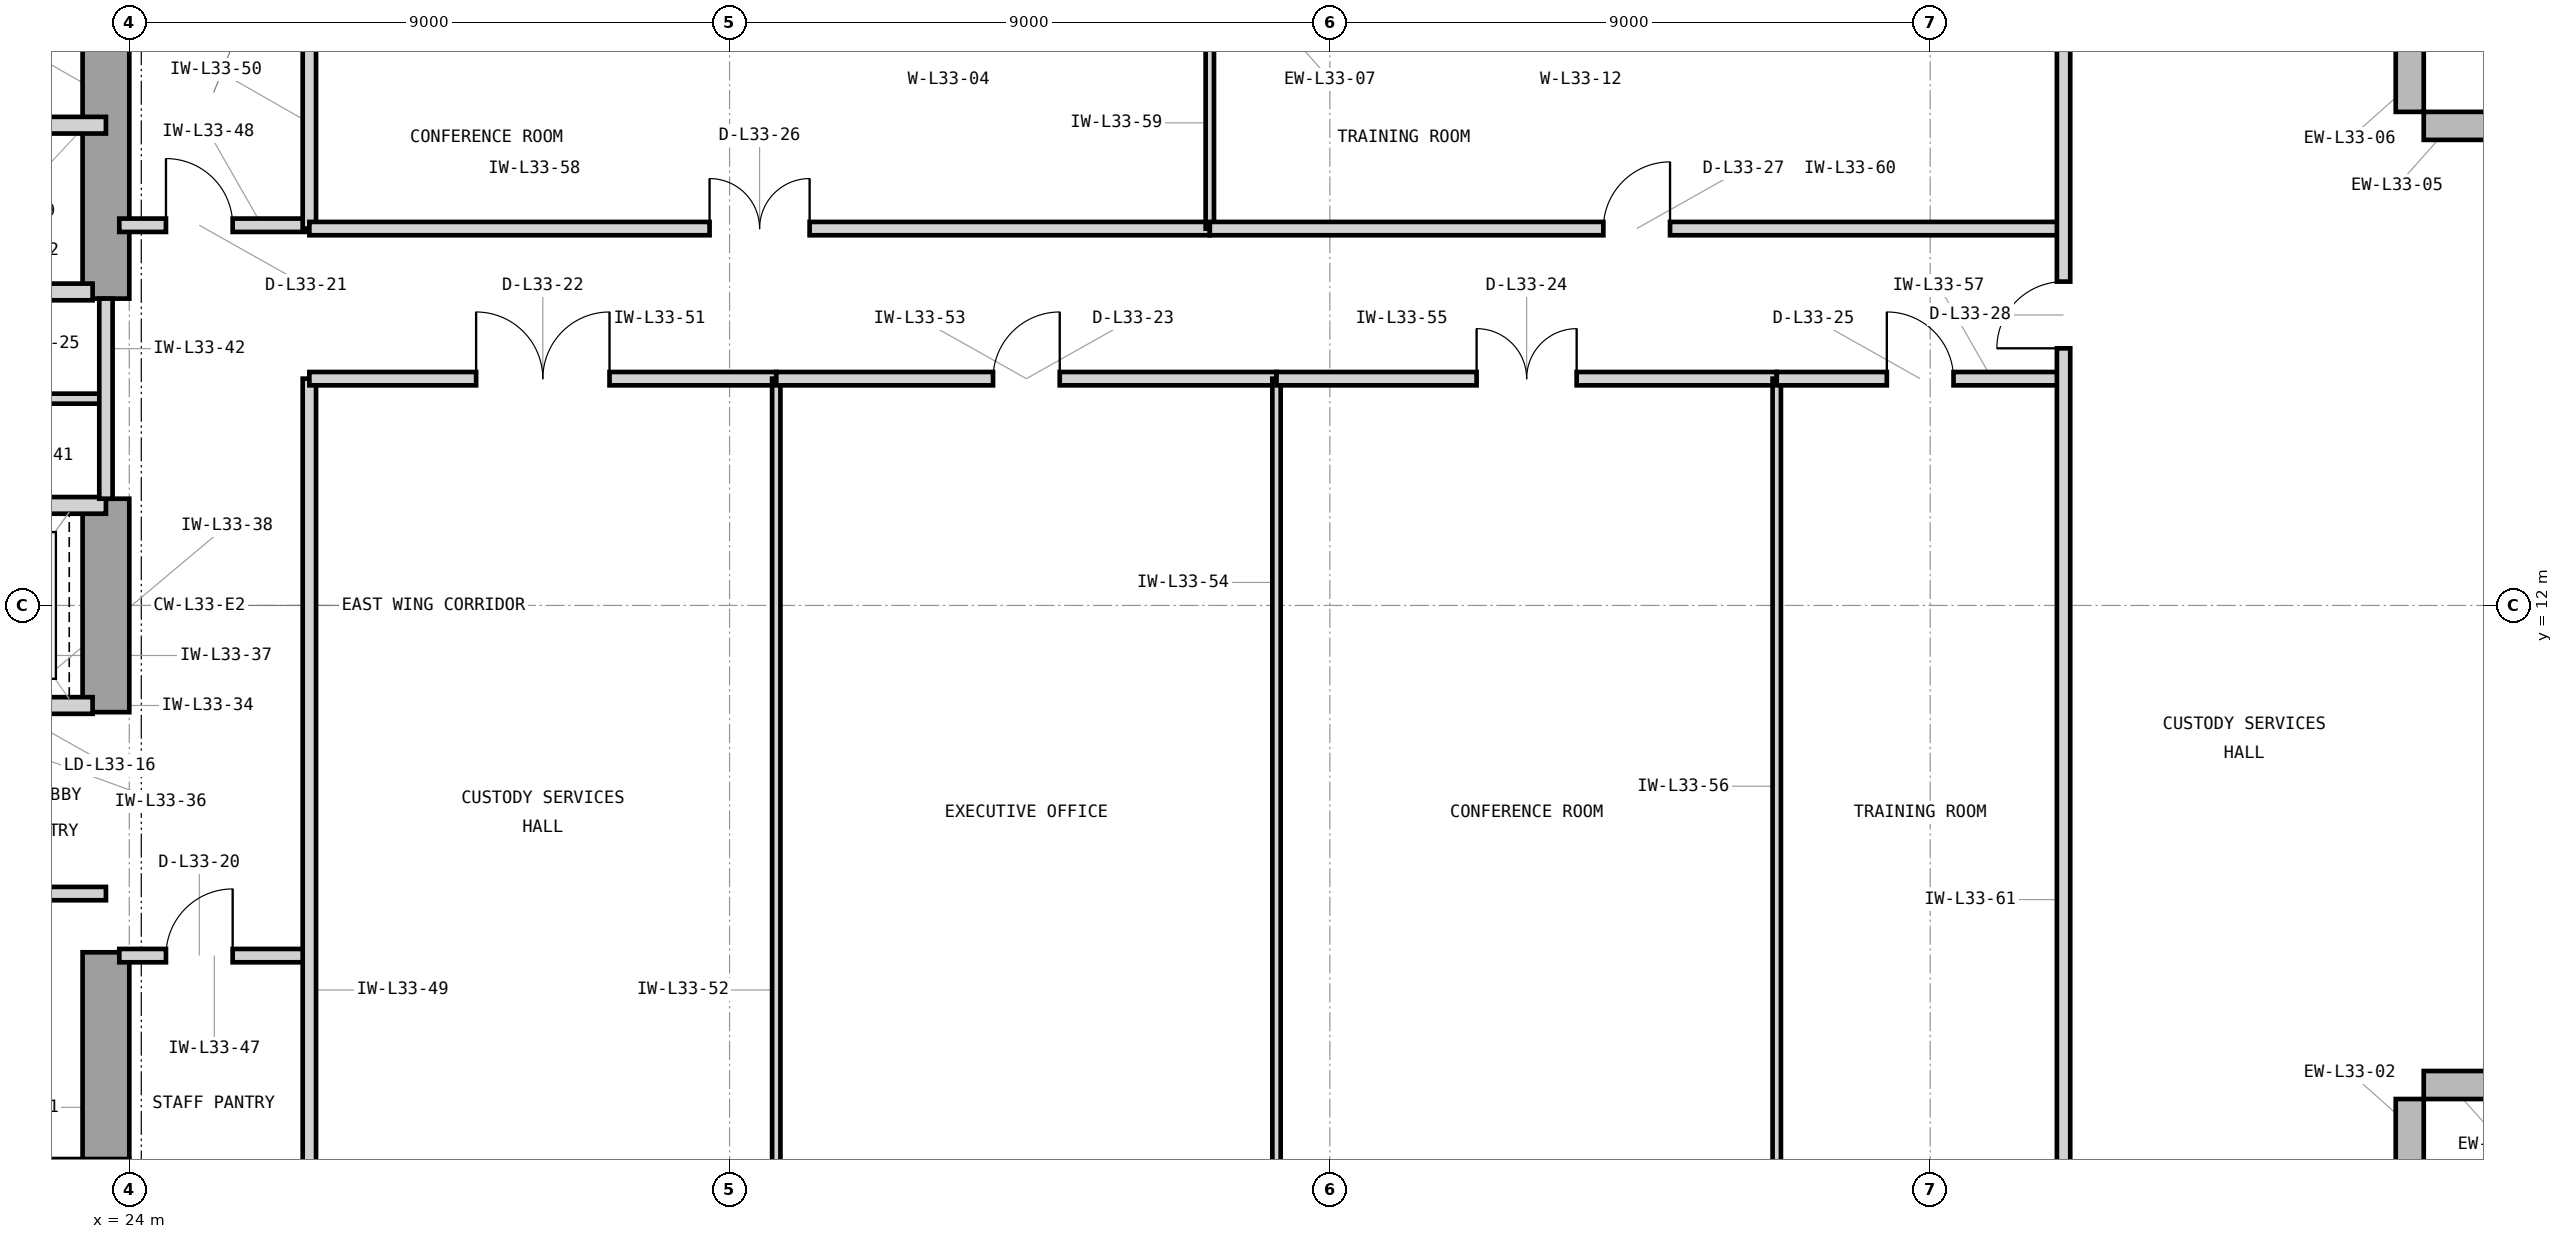
"""IFC4 building model, lengths in metres.
Left out: names, types, materials, properties, quantities, classifications, styles, units other than length and angle.
Written with IfcOpenShell. Run it as: python <this file> out.ifc"""

import sys

from ifc_helpers import new_model, si_unit, direction, frame, frame_2d, origin, place, context, subcontext, project, spatial, rectangle, extrude, element, fill, save


model = new_model("IFC4")
c1 = context("Model", 3, precision=1e-05, world=origin(), true_north=direction((0.0, 1.0)))
c2 = subcontext(c1, "Body", "Model", "MODEL_VIEW")
j1 = project(units=[si_unit("LENGTHUNIT", "METRE"), si_unit("PLANEANGLEUNIT", "RADIAN")], contexts=[c1])
p1 = place(None, origin())
s1 = spatial("IfcSite", under=j1, at=p1, CompositionType="ELEMENT")
p2 = place(p1, origin())
s2 = spatial("IfcBuilding", under=s1, at=p2, CompositionType="ELEMENT")
p3 = place(p2, frame((0.0, 0.0, 140.1)))
s3 = spatial("IfcBuildingStorey", under=s2, at=p3, CompositionType="ELEMENT", Elevation=140.1)
p4 = place(p3, frame((7.475, 3.35, 0.0), z_axis=(0.0, 0.0, 1.0), x_axis=(1.0, 0.0, 0.0)))
e1 = element("IfcWall", 1, at=p4, inside=s3, PredefinedType="SHEAR", context=c2, shape_type="SweptSolid", body=[
    extrude(rectangle(XDim=16.525, YDim=0.7, at=frame_2d((8.262, 0.0))), origin(), (0.0, 0.0, 1.0), 3.9),
])
p5 = place(p3, frame((23.65, 3.7, 0.0), z_axis=(0.0, 0.0, 1.0), x_axis=(0.0, 1.0, 0.0)))
e2 = element("IfcWall", 2, at=p5, inside=s3, PredefinedType="SHEAR", context=c2, shape_type="SweptSolid", body=[
    extrude(rectangle(XDim=3.1, YDim=0.7, at=frame_2d((1.55, 0.0))), origin(), (0.0, 0.0, 1.0), 3.9),
])
p6 = place(p3, frame((23.65, 10.4, 0.0), z_axis=(0.0, 0.0, 1.0), x_axis=(0.0, 1.0, 0.0)))
e3 = element("IfcWall", 3, at=p6, inside=s3, PredefinedType="SHEAR", context=c2, shape_type="SweptSolid", body=[
    extrude(rectangle(XDim=3.2, YDim=0.7, at=frame_2d((1.6, 0.0))), origin(), (0.0, 0.0, 1.0), 3.9),
])
p7 = place(p3, frame((23.65, 16.6, 0.0), z_axis=(0.0, 0.0, 1.0), x_axis=(0.0, 1.0, 0.0)))
e4 = element("IfcWall", 4, at=p7, inside=s3, PredefinedType="SHEAR", context=c2, shape_type="SweptSolid", body=[
    extrude(rectangle(XDim=4.05, YDim=0.7, at=frame_2d((2.025, 0.0))), origin(), (0.0, 0.0, 1.0), 3.9),
])
for number, where, z_axis, x_axis in (
    (5, (58.19, 3.0, 0.0), (0.0, 0.0, 1.0), (0.0, 1.0, 0.0)),
    (6, (58.4, 4.81, 0.0), (0.0, 0.0, 1.0), (1.0, 0.0, 0.0)),
    (7, (60.0, 19.19, 0.0), (0.0, 0.0, 1.0), (-1.0, 0.0, 0.0)),
    (8, (58.19, 19.4, 0.0), (0.0, 0.0, 1.0), (0.0, 1.0, 0.0)),
):
    element("IfcWall", number, at=place(p3, frame(where, z_axis=z_axis, x_axis=x_axis)), inside=s3, PredefinedType="STANDARD", context=c2, shape_type="SweptSolid", body=[
        extrude(rectangle(XDim=1.6, YDim=0.42, at=frame_2d((0.8, 0.0))), origin(), (0.0, 0.0, 1.0), 3.7),
    ])
p8 = place(p3, frame((21.05, 16.7, 0.0), z_axis=(0.0, 0.0, 1.0), x_axis=(1.0, 0.0, 0.0)))
e9 = element("IfcWall", 9, at=p8, inside=s3, PredefinedType="PARTITIONING", context=c2, shape_type="SweptSolid", body=[
    extrude(rectangle(XDim=2.4, YDim=0.25, at=frame_2d((1.2, 0.0))), origin(), (0.0, 0.0, 1.0), 3.233),
])
p9 = place(p3, frame((16.45, 19.2, 0.0), z_axis=(0.0, 0.0, 1.0), x_axis=(1.0, 0.0, 0.0)))
e10 = element("IfcWall", 10, at=p9, inside=s3, PredefinedType="PARTITIONING", context=c2, shape_type="SweptSolid", body=[
    extrude(rectangle(XDim=7.2, YDim=0.25, at=frame_2d((3.6, 0.0))), origin(), (0.0, 0.0, 1.0), 3.69),
])
p10 = place(p3, frame((20.55, 7.68, 0.0), z_axis=(0.0, 0.0, 1.0), x_axis=(1.0, 0.0, 0.0)))
e11 = element("IfcWall", 11, at=p10, inside=s3, PredefinedType="PARTITIONING", context=c2, shape_type="SweptSolid", body=[
    extrude(rectangle(XDim=3.1, YDim=0.2, at=frame_2d((1.55, 0.0))), origin(), (0.0, 0.0, 1.0), 3.69),
])
p11 = place(p10, frame((1.075, 0.0, 0.0)))
e12 = element("IfcOpeningElement", 12, at=p11, cuts=e11, PredefinedType="OPENING", context=c2, shape_type="SweptSolid", body=[
    extrude(rectangle(XDim=0.95, YDim=2.1, at=frame_2d((0.475, 1.05))), frame((0.0, 0.11, 0.0), z_axis=(0.0, -1.0, 0.0), x_axis=(1.0, 0.0, 0.0)), (0.0, 0.0, 1.0), 0.22),
])
p12 = place(p3, frame((21.05, 10.5, 0.0), z_axis=(0.0, 0.0, 1.0), x_axis=(1.0, 0.0, 0.0)))
e13 = element("IfcWall", 13, at=p12, inside=s3, PredefinedType="PARTITIONING", context=c2, shape_type="SweptSolid", body=[
    extrude(rectangle(XDim=2.4, YDim=0.25, at=frame_2d((1.2, 0.0))), origin(), (0.0, 0.0, 1.0), 3.233),
])
p13 = place(p12, frame((0.48, 0.0, 0.0)))
e14 = element("IfcOpeningElement", 14, at=p13, cuts=e13, PredefinedType="OPENING", context=c2, shape_type="SweptSolid", body=[
    extrude(rectangle(XDim=1.15, YDim=2.25, at=frame_2d((0.575, 1.125))), frame((0.0, 0.135, 0.0), z_axis=(0.0, -1.0, 0.0), x_axis=(1.0, 0.0, 0.0)), (0.0, 0.0, 1.0), 0.27),
])
p14 = place(p3, frame((14.7, 13.5, 0.0), z_axis=(0.0, 0.0, 1.0), x_axis=(1.0, 0.0, 0.0)))
e15 = element("IfcWall", 15, at=p14, inside=s3, PredefinedType="PARTITIONING", context=c2, shape_type="SweptSolid", body=[
    extrude(rectangle(XDim=8.95, YDim=0.25, at=frame_2d((4.475, 0.0))), origin(), (0.0, 0.0, 1.0), 3.233),
])
p15 = place(p3, frame((16.6, 15.1, 0.0), z_axis=(0.0, 0.0, 1.0), x_axis=(1.0, 0.0, 0.0)))
e16 = element("IfcWall", 16, at=p15, inside=s3, PredefinedType="PARTITIONING", context=c2, shape_type="SweptSolid", body=[
    extrude(rectangle(XDim=7.05, YDim=0.15, at=frame_2d((3.525, 0.0))), origin(), (0.0, 0.0, 1.0), 3.69),
])
p16 = place(p3, frame((23.65, 13.6, 0.0), z_axis=(0.0, 0.0, 1.0), x_axis=(0.0, 1.0, 0.0)))
e17 = element("IfcWall", 17, at=p16, inside=s3, PredefinedType="PARTITIONING", context=c2, shape_type="SweptSolid", body=[
    extrude(rectangle(XDim=3.0, YDim=0.2, at=frame_2d((1.5, 0.0))), origin(), (0.0, 0.0, 1.0), 3.69),
])
p17 = place(p3, frame((23.85, 6.75, 0.0), z_axis=(0.0, 0.0, 1.0), x_axis=(1.0, 0.0, 0.0)))
e18 = element("IfcWall", 18, at=p17, inside=s3, PredefinedType="PARTITIONING", context=c2, shape_type="SweptSolid", body=[
    extrude(rectangle(XDim=2.85, YDim=0.2, at=frame_2d((1.425, 0.0))), origin(), (0.0, 0.0, 1.0), 3.69),
])
p18 = place(p17, frame((0.7, 0.0, 0.0)))
e19 = element("IfcOpeningElement", 19, at=p18, cuts=e18, PredefinedType="OPENING", context=c2, shape_type="SweptSolid", body=[
    extrude(rectangle(XDim=1.0, YDim=2.15, at=frame_2d((0.5, 1.075))), frame((0.0, 0.11, 0.0), z_axis=(0.0, -1.0, 0.0), x_axis=(1.0, 0.0, 0.0)), (0.0, 0.0, 1.0), 0.22),
])
p19 = place(p3, frame((23.85, 17.7, 0.0), z_axis=(0.0, 0.0, 1.0), x_axis=(1.0, 0.0, 0.0)))
e20 = element("IfcWall", 20, at=p19, inside=s3, PredefinedType="PARTITIONING", context=c2, shape_type="SweptSolid", body=[
    extrude(rectangle(XDim=2.85, YDim=0.2, at=frame_2d((1.425, 0.0))), origin(), (0.0, 0.0, 1.0), 3.69),
])
p20 = place(p19, frame((0.7, 0.0, 0.0)))
e21 = element("IfcOpeningElement", 21, at=p20, cuts=e20, PredefinedType="OPENING", context=c2, shape_type="SweptSolid", body=[
    extrude(rectangle(XDim=1.0, YDim=2.15, at=frame_2d((0.5, 1.075))), frame((0.0, 0.11, 0.0), z_axis=(0.0, -1.0, 0.0), x_axis=(1.0, 0.0, 0.0)), (0.0, 0.0, 1.0), 0.22),
])
p21 = place(p3, frame((26.7, 3.18, 0.0), z_axis=(0.0, 0.0, 1.0), x_axis=(0.0, 1.0, 0.0)))
e22 = element("IfcWall", 22, at=p21, inside=s3, PredefinedType="PARTITIONING", context=c2, shape_type="SweptSolid", body=[
    extrude(rectangle(XDim=12.22, YDim=0.2, at=frame_2d((6.11, 0.0))), origin(), (0.0, 0.0, 1.0), 3.69),
])
p22 = place(p3, frame((26.7, 17.65, 0.0), z_axis=(0.0, 0.0, 1.0), x_axis=(0.0, 1.0, 0.0)))
e23 = element("IfcWall", 23, at=p22, inside=s3, PredefinedType="PARTITIONING", context=c2, shape_type="SweptSolid", body=[
    extrude(rectangle(XDim=3.17, YDim=0.2, at=frame_2d((1.585, 0.0))), origin(), (0.0, 0.0, 1.0), 3.69),
])
p23 = place(p3, frame((26.7, 15.4, 0.0), z_axis=(0.0, 0.0, 1.0), x_axis=(1.0, 0.0, 0.0)))
e24 = element("IfcWall", 24, at=p23, inside=s3, PredefinedType="PARTITIONING", context=c2, shape_type="SweptSolid", body=[
    extrude(rectangle(XDim=7.0, YDim=0.2, at=frame_2d((3.5, 0.0))), origin(), (0.0, 0.0, 1.0), 3.69),
])
p24 = place(p23, frame((2.5, 0.0, 0.0)))
e25 = element("IfcOpeningElement", 25, at=p24, cuts=e24, PredefinedType="OPENING", context=c2, shape_type="SweptSolid", body=[
    extrude(rectangle(XDim=2.0, YDim=2.5, at=frame_2d((1.0, 1.25))), frame((0.0, 0.11, 0.0), z_axis=(0.0, -1.0, 0.0), x_axis=(1.0, 0.0, 0.0)), (0.0, 0.0, 1.0), 0.22),
])
p25 = place(p3, frame((33.7, 3.18, 0.0), z_axis=(0.0, 0.0, 1.0), x_axis=(0.0, 1.0, 0.0)))
e26 = element("IfcWall", 26, at=p25, inside=s3, PredefinedType="PARTITIONING", context=c2, shape_type="SweptSolid", body=[
    extrude(rectangle(XDim=12.22, YDim=0.125, at=frame_2d((6.11, 0.0))), origin(), (0.0, 0.0, 1.0), 3.69),
])
p26 = place(p3, frame((33.7, 15.4, 0.0), z_axis=(0.0, 0.0, 1.0), x_axis=(1.0, 0.0, 0.0)))
e27 = element("IfcWall", 27, at=p26, inside=s3, PredefinedType="PARTITIONING", context=c2, shape_type="SweptSolid", body=[
    extrude(rectangle(XDim=7.5, YDim=0.2, at=frame_2d((3.75, 0.0))), origin(), (0.0, 0.0, 1.0), 3.69),
])
p27 = place(p26, frame((3.25, 0.0, 0.0)))
e28 = element("IfcOpeningElement", 28, at=p27, cuts=e27, PredefinedType="OPENING", context=c2, shape_type="SweptSolid", body=[
    extrude(rectangle(XDim=1.0, YDim=2.15, at=frame_2d((0.5, 1.075))), frame((0.0, 0.11, 0.0), z_axis=(0.0, -1.0, 0.0), x_axis=(1.0, 0.0, 0.0)), (0.0, 0.0, 1.0), 0.22),
])
p28 = place(p3, frame((41.2, 3.18, 0.0), z_axis=(0.0, 0.0, 1.0), x_axis=(0.0, 1.0, 0.0)))
e29 = element("IfcWall", 29, at=p28, inside=s3, PredefinedType="PARTITIONING", context=c2, shape_type="SweptSolid", body=[
    extrude(rectangle(XDim=12.22, YDim=0.125, at=frame_2d((6.11, 0.0))), origin(), (0.0, 0.0, 1.0), 3.69),
])
p29 = place(p3, frame((41.2, 15.4, 0.0), z_axis=(0.0, 0.0, 1.0), x_axis=(1.0, 0.0, 0.0)))
e30 = element("IfcWall", 30, at=p29, inside=s3, PredefinedType="PARTITIONING", context=c2, shape_type="SweptSolid", body=[
    extrude(rectangle(XDim=7.5, YDim=0.2, at=frame_2d((3.75, 0.0))), origin(), (0.0, 0.0, 1.0), 3.69),
])
p30 = place(p29, frame((3.0, 0.0, 0.0)))
e31 = element("IfcOpeningElement", 31, at=p30, cuts=e30, PredefinedType="OPENING", context=c2, shape_type="SweptSolid", body=[
    extrude(rectangle(XDim=1.5, YDim=2.3, at=frame_2d((0.75, 1.15))), frame((0.0, 0.11, 0.0), z_axis=(0.0, -1.0, 0.0), x_axis=(1.0, 0.0, 0.0)), (0.0, 0.0, 1.0), 0.22),
])
p31 = place(p3, frame((48.7, 3.18, 0.0), z_axis=(0.0, 0.0, 1.0), x_axis=(0.0, 1.0, 0.0)))
e32 = element("IfcWall", 32, at=p31, inside=s3, PredefinedType="PARTITIONING", context=c2, shape_type="SweptSolid", body=[
    extrude(rectangle(XDim=12.22, YDim=0.125, at=frame_2d((6.11, 0.0))), origin(), (0.0, 0.0, 1.0), 3.69),
])
p32 = place(p3, frame((48.7, 15.4, 0.0), z_axis=(0.0, 0.0, 1.0), x_axis=(1.0, 0.0, 0.0)))
e33 = element("IfcWall", 33, at=p32, inside=s3, PredefinedType="PARTITIONING", context=c2, shape_type="SweptSolid", body=[
    extrude(rectangle(XDim=4.3, YDim=0.2, at=frame_2d((2.15, 0.0))), origin(), (0.0, 0.0, 1.0), 3.69),
])
p33 = place(p32, frame((1.65, 0.0, 0.0)))
e34 = element("IfcOpeningElement", 34, at=p33, cuts=e33, PredefinedType="OPENING", context=c2, shape_type="SweptSolid", body=[
    extrude(rectangle(XDim=1.0, YDim=2.15, at=frame_2d((0.5, 1.075))), frame((0.0, 0.11, 0.0), z_axis=(0.0, -1.0, 0.0), x_axis=(1.0, 0.0, 0.0)), (0.0, 0.0, 1.0), 0.22),
])
p34 = place(p3, frame((26.7, 17.65, 0.0), z_axis=(0.0, 0.0, 1.0), x_axis=(1.0, 0.0, 0.0)))
e35 = element("IfcWall", 35, at=p34, inside=s3, PredefinedType="PARTITIONING", context=c2, shape_type="SweptSolid", body=[
    extrude(rectangle(XDim=13.5, YDim=0.2, at=frame_2d((6.75, 0.0))), origin(), (0.0, 0.0, 1.0), 3.69),
])
p35 = place(p34, frame((6.0, 0.0, 0.0)))
e36 = element("IfcOpeningElement", 36, at=p35, cuts=e35, PredefinedType="OPENING", context=c2, shape_type="SweptSolid", body=[
    extrude(rectangle(XDim=1.5, YDim=2.3, at=frame_2d((0.75, 1.15))), frame((0.0, 0.11, 0.0), z_axis=(0.0, -1.0, 0.0), x_axis=(1.0, 0.0, 0.0)), (0.0, 0.0, 1.0), 0.22),
])
p36 = place(p3, frame((40.2, 17.65, 0.0), z_axis=(0.0, 0.0, 1.0), x_axis=(0.0, 1.0, 0.0)))
e37 = element("IfcWall", 37, at=p36, inside=s3, PredefinedType="PARTITIONING", context=c2, shape_type="SweptSolid", body=[
    extrude(rectangle(XDim=3.17, YDim=0.125, at=frame_2d((1.585, 0.0))), origin(), (0.0, 0.0, 1.0), 3.69),
])
p37 = place(p3, frame((40.2, 17.65, 0.0), z_axis=(0.0, 0.0, 1.0), x_axis=(1.0, 0.0, 0.0)))
e38 = element("IfcWall", 38, at=p37, inside=s3, PredefinedType="PARTITIONING", context=c2, shape_type="SweptSolid", body=[
    extrude(rectangle(XDim=12.8, YDim=0.2, at=frame_2d((6.4, 0.0))), origin(), (0.0, 0.0, 1.0), 3.69),
])
p38 = place(p37, frame((5.9, 0.0, 0.0)))
e39 = element("IfcOpeningElement", 39, at=p38, cuts=e38, PredefinedType="OPENING", context=c2, shape_type="SweptSolid", body=[
    extrude(rectangle(XDim=1.0, YDim=2.15, at=frame_2d((0.5, 1.075))), frame((0.0, 0.11, 0.0), z_axis=(0.0, -1.0, 0.0), x_axis=(1.0, 0.0, 0.0)), (0.0, 0.0, 1.0), 0.22),
])
p39 = place(p3, frame((53.0, 3.18, 0.0), z_axis=(0.0, 0.0, 1.0), x_axis=(0.0, 1.0, 0.0)))
e40 = element("IfcWall", 40, at=p39, inside=s3, PredefinedType="PARTITIONING", context=c2, shape_type="SweptSolid", body=[
    extrude(rectangle(XDim=17.64, YDim=0.2, at=frame_2d((8.82, 0.0))), origin(), (0.0, 0.0, 1.0), 3.69),
])
p40 = place(p39, frame((12.675, 0.0, 0.0)))
e41 = element("IfcOpeningElement", 41, at=p40, cuts=e40, PredefinedType="OPENING", context=c2, shape_type="SweptSolid", body=[
    extrude(rectangle(XDim=1.0, YDim=2.15, at=frame_2d((0.5, 1.075))), frame((0.0, 0.11, 0.0), z_axis=(0.0, -1.0, 0.0), x_axis=(1.0, 0.0, 0.0)), (0.0, 0.0, 1.0), 0.22),
])
p41 = place(p18, origin())
e42 = element("IfcDoor", 42, at=p41, inside=s3, OperationType="SINGLE_SWING_RIGHT", PredefinedType="DOOR", context=c2, shape_type="SweptSolid", body=[
    extrude(rectangle(XDim=1.0, YDim=2.15, at=frame_2d((0.5, 1.075))), frame((0.0, 0.025, 0.0), z_axis=(0.0, -1.0, 0.0), x_axis=(1.0, 0.0, 0.0)), (0.0, 0.0, 1.0), 0.05),
])
fill(e19, e42)
p42 = place(p20, origin())
e43 = element("IfcDoor", 43, at=p42, inside=s3, OperationType="SINGLE_SWING_LEFT", PredefinedType="DOOR", context=c2, shape_type="SweptSolid", body=[
    extrude(rectangle(XDim=1.0, YDim=2.15, at=frame_2d((0.5, 1.075))), frame((0.0, 0.025, 0.0), z_axis=(0.0, -1.0, 0.0), x_axis=(1.0, 0.0, 0.0)), (0.0, 0.0, 1.0), 0.05),
])
fill(e21, e43)
p43 = place(p24, origin())
e44 = element("IfcDoor", 44, at=p43, inside=s3, OperationType="DOUBLE_DOOR_SINGLE_SWING", PredefinedType="DOOR", context=c2, shape_type="SweptSolid", body=[
    extrude(rectangle(XDim=2.0, YDim=2.5, at=frame_2d((1.0, 1.25))), frame((0.0, 0.025, 0.0), z_axis=(0.0, -1.0, 0.0), x_axis=(1.0, 0.0, 0.0)), (0.0, 0.0, 1.0), 0.05),
])
fill(e25, e44)
p44 = place(p27, origin())
e45 = element("IfcDoor", 45, at=p44, inside=s3, OperationType="SINGLE_SWING_RIGHT", PredefinedType="DOOR", context=c2, shape_type="SweptSolid", body=[
    extrude(rectangle(XDim=1.0, YDim=2.15, at=frame_2d((0.5, 1.075))), frame((0.0, 0.025, 0.0), z_axis=(0.0, -1.0, 0.0), x_axis=(1.0, 0.0, 0.0)), (0.0, 0.0, 1.0), 0.05),
])
fill(e28, e45)
p45 = place(p30, origin())
e46 = element("IfcDoor", 46, at=p45, inside=s3, OperationType="DOUBLE_DOOR_SINGLE_SWING", PredefinedType="DOOR", context=c2, shape_type="SweptSolid", body=[
    extrude(rectangle(XDim=1.5, YDim=2.3, at=frame_2d((0.75, 1.15))), frame((0.0, 0.025, 0.0), z_axis=(0.0, -1.0, 0.0), x_axis=(1.0, 0.0, 0.0)), (0.0, 0.0, 1.0), 0.05),
])
fill(e31, e46)
p46 = place(p33, origin())
e47 = element("IfcDoor", 47, at=p46, inside=s3, OperationType="SINGLE_SWING_LEFT", PredefinedType="DOOR", context=c2, shape_type="SweptSolid", body=[
    extrude(rectangle(XDim=1.0, YDim=2.15, at=frame_2d((0.5, 1.075))), frame((0.0, 0.025, 0.0), z_axis=(0.0, -1.0, 0.0), x_axis=(1.0, 0.0, 0.0)), (0.0, 0.0, 1.0), 0.05),
])
fill(e34, e47)
p47 = place(p35, origin())
e48 = element("IfcDoor", 48, at=p47, inside=s3, OperationType="DOUBLE_DOOR_SINGLE_SWING", PredefinedType="DOOR", context=c2, shape_type="SweptSolid", body=[
    extrude(rectangle(XDim=1.5, YDim=2.3, at=frame_2d((0.75, 1.15))), frame((0.0, 0.025, 0.0), z_axis=(0.0, -1.0, 0.0), x_axis=(1.0, 0.0, 0.0)), (0.0, 0.0, 1.0), 0.05),
])
fill(e36, e48)
p48 = place(p38, origin())
e49 = element("IfcDoor", 49, at=p48, inside=s3, OperationType="SINGLE_SWING_RIGHT", PredefinedType="DOOR", context=c2, shape_type="SweptSolid", body=[
    extrude(rectangle(XDim=1.0, YDim=2.15, at=frame_2d((0.5, 1.075))), frame((0.0, 0.025, 0.0), z_axis=(0.0, -1.0, 0.0), x_axis=(1.0, 0.0, 0.0)), (0.0, 0.0, 1.0), 0.05),
])
fill(e39, e49)
p49 = place(p40, origin())
e50 = element("IfcDoor", 50, at=p49, inside=s3, OperationType="SINGLE_SWING_LEFT", PredefinedType="DOOR", context=c2, shape_type="SweptSolid", body=[
    extrude(rectangle(XDim=1.0, YDim=2.15, at=frame_2d((0.5, 1.075))), frame((0.0, 0.025, 0.0), z_axis=(0.0, -1.0, 0.0), x_axis=(1.0, 0.0, 0.0)), (0.0, 0.0, 1.0), 0.05),
])
fill(e41, e50)
save(model, sys.argv[1])
